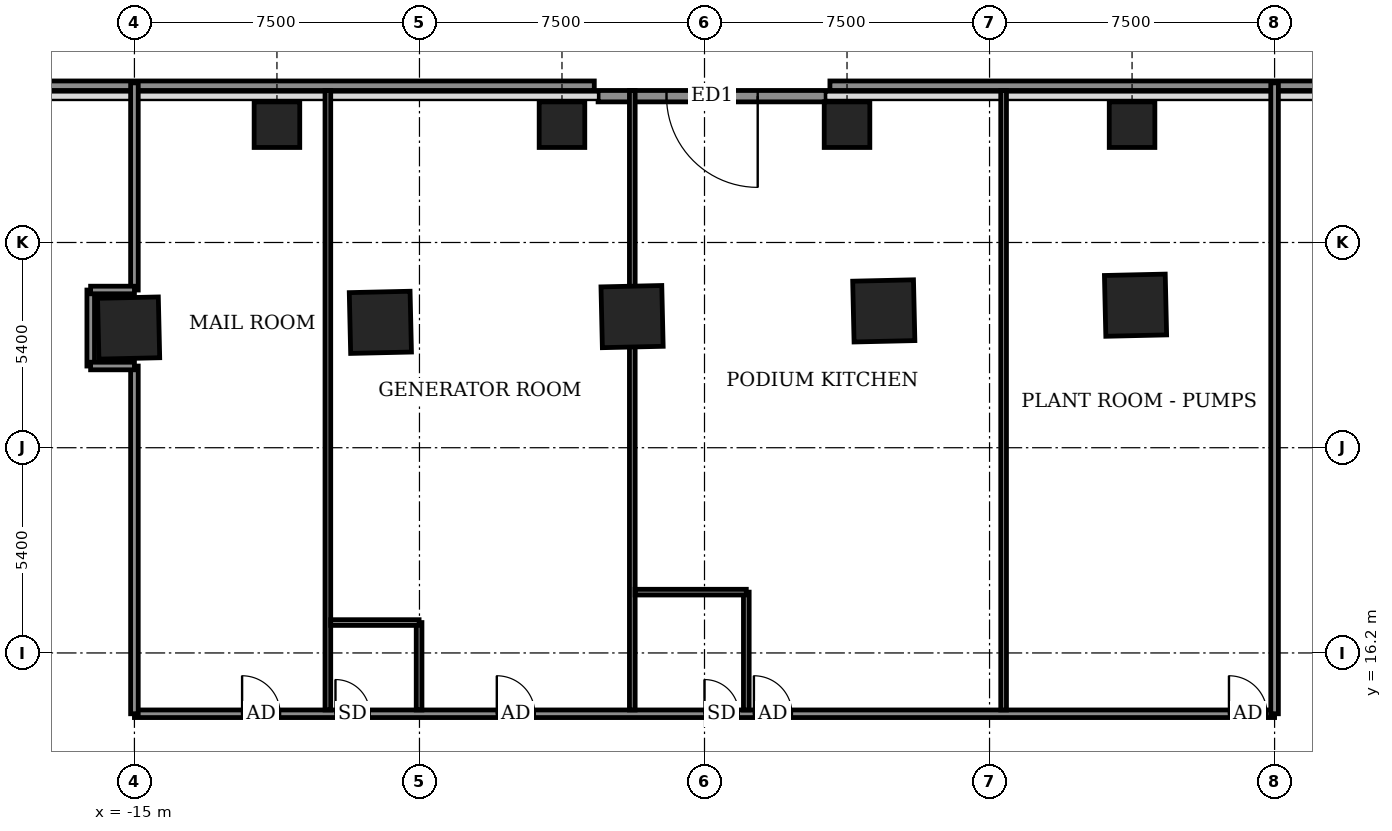
"""IFC4 building model, lengths in metres.
Left out: names, types, materials, properties, quantities, classifications, styles, units other than length and angle.
Written with IfcOpenShell. Run it as: python <this file> out.ifc"""

import sys

from ifc_helpers import new_model, si_unit, direction, frame, frame_2d, origin, origin_2d, place, context, subcontext, project, spatial, rectangle, extrude, element, fill, save


model = new_model("IFC4")
c1 = context("Model", 3, precision=1e-05, world=origin(), true_north=direction((0.0, 1.0)))
c2 = subcontext(c1, "Body", "Model", "MODEL_VIEW")
j1 = project(units=[si_unit("LENGTHUNIT", "METRE"), si_unit("PLANEANGLEUNIT", "RADIAN")], contexts=[c1])
p1 = place(None, origin())
s1 = spatial("IfcSite", under=j1, at=p1, CompositionType="ELEMENT")
p2 = place(p1, origin())
s2 = spatial("IfcBuilding", under=s1, at=p2, CompositionType="ELEMENT")
p3 = place(p2, origin())
s3 = spatial("IfcBuildingStorey", under=s2, at=p3, CompositionType="ELEMENT", Elevation=0.0)
for number, where, z_axis, x_axis in (
    (1, (11.341, 25.35, -0.3), (0.0, 0.0, 1.0), (-1.0, -0.023, 0.0)),
    (2, (4.717, 25.2, -0.3), (0.0, 0.0, 1.0), (-1.0, -0.023, 0.0)),
    (3, (-1.906, 25.05, -0.3), (0.0, 0.0, 1.0), (-1.0, -0.023, 0.0)),
    (4, (-8.529, 24.899, -0.3), (0.0, 0.0, 1.0), (-1.0, -0.023, 0.0)),
    (5, (-15.153, 24.749, -0.3), (0.0, 0.0, 1.0), (-1.0, -0.023, 0.0)),
):
    element("IfcColumn", number, at=place(p3, frame(where, z_axis=z_axis, x_axis=x_axis)), inside=s3, PredefinedType="COLUMN", context=c2, shape_type="SweptSolid", body=[
        extrude(rectangle(XDim=1.6, YDim=1.6, at=origin_2d()), origin(), (0.0, 0.0, 1.0), 5.75),
    ])
for number, where, z_axis, x_axis in (
    (6, (-11.25, 30.1, -0.3), (0.0, 0.0, 1.0), (1.0, 0.0, 0.0)),
    (7, (-3.75, 30.1, -0.3), (0.0, 0.0, 1.0), (1.0, 0.0, 0.0)),
    (8, (3.75, 30.1, -0.3), (0.0, 0.0, 1.0), (1.0, 0.0, 0.0)),
    (9, (11.25, 30.1, -0.3), (0.0, 0.0, 1.0), (1.0, 0.0, 0.0)),
):
    element("IfcColumn", number, at=place(p3, frame(where, z_axis=z_axis, x_axis=x_axis)), inside=s3, PredefinedType="COLUMN", context=c2, shape_type="SweptSolid", body=[
        extrude(rectangle(XDim=1.2, YDim=1.2, at=origin_2d()), origin(), (0.0, 0.0, 1.0), 5.75),
    ])
p4 = place(p3, frame((3.2, 30.85, 0.0), z_axis=(0.0, 0.0, 1.0), x_axis=(-1.0, 0.0, 0.0)))
e10 = element("IfcWall", 10, at=p4, inside=s3, PredefinedType="SOLIDWALL", context=c2, shape_type="SweptSolid", body=[
    extrude(rectangle(XDim=6.0, YDim=0.3, at=frame_2d((3.0, 0.0))), origin(), (0.0, 0.0, 1.0), 5.45),
])
p5 = place(p4, frame((1.8, 0.0, 0.0)))
e11 = element("IfcOpeningElement", 11, at=p5, cuts=e10, PredefinedType="OPENING", context=c2, shape_type="SweptSolid", body=[
    extrude(rectangle(XDim=2.4, YDim=2.7, at=frame_2d((1.2, 1.35))), frame((0.0, 0.16, 0.0), z_axis=(0.0, -1.0, 0.0), x_axis=(1.0, 0.0, 0.0)), (0.0, 0.0, 1.0), 0.32),
])
p6 = place(p3, frame((32.2, 31.125, 0.0), z_axis=(0.0, 0.0, 1.0), x_axis=(-1.0, 0.0, 0.0)))
e12 = element("IfcWall", 12, at=p6, inside=s3, PredefinedType="STANDARD", context=c2, shape_type="SweptSolid", body=[
    extrude(rectangle(XDim=28.9, YDim=0.25, at=frame_2d((14.45, 0.0))), origin(), (0.0, 0.0, 1.0), 0.9),
])
p7 = place(p3, frame((-2.9, 31.125, 0.0), z_axis=(0.0, 0.0, 1.0), x_axis=(-1.0, 0.0, 0.0)))
e13 = element("IfcWall", 13, at=p7, inside=s3, PredefinedType="STANDARD", context=c2, shape_type="SweptSolid", body=[
    extrude(rectangle(XDim=29.3, YDim=0.25, at=frame_2d((14.65, 0.0))), origin(), (0.0, 0.0, 1.0), 0.9),
])
p8 = place(p3, frame((-15.0, 14.6, 0.0), z_axis=(0.0, 0.0, 1.0), x_axis=(1.0, 0.0, 0.0)))
e14 = element("IfcWall", 14, at=p8, inside=s3, PredefinedType="PARTITIONING", context=c2, shape_type="SweptSolid", body=[
    extrude(rectangle(XDim=30.0, YDim=0.2, at=frame_2d((15.0, 0.0))), origin(), (0.0, 0.0, 1.0), 5.45),
])
p9 = place(p8, frame((2.833, 0.0, 0.0)))
e15 = element("IfcOpeningElement", 15, at=p9, cuts=e14, PredefinedType="OPENING", context=c2, shape_type="SweptSolid", body=[
    extrude(rectangle(XDim=1.0, YDim=2.1, at=frame_2d((0.5, 1.05))), frame((0.0, 0.11, 0.0), z_axis=(0.0, -1.0, 0.0), x_axis=(1.0, 0.0, 0.0)), (0.0, 0.0, 1.0), 0.22),
])
p10 = place(p8, frame((9.535, 0.0, 0.0)))
e16 = element("IfcOpeningElement", 16, at=p10, cuts=e14, PredefinedType="OPENING", context=c2, shape_type="SweptSolid", body=[
    extrude(rectangle(XDim=1.0, YDim=2.1, at=frame_2d((0.5, 1.05))), frame((0.0, 0.11, 0.0), z_axis=(0.0, -1.0, 0.0), x_axis=(1.0, 0.0, 0.0)), (0.0, 0.0, 1.0), 0.22),
])
p11 = place(p8, frame((5.29, 0.0, 0.0)))
e17 = element("IfcOpeningElement", 17, at=p11, cuts=e14, PredefinedType="OPENING", context=c2, shape_type="SweptSolid", body=[
    extrude(rectangle(XDim=0.9, YDim=2.1, at=frame_2d((0.45, 1.05))), frame((0.0, 0.11, 0.0), z_axis=(0.0, -1.0, 0.0), x_axis=(1.0, 0.0, 0.0)), (0.0, 0.0, 1.0), 0.22),
])
p12 = place(p8, frame((16.3, 0.0, 0.0)))
e18 = element("IfcOpeningElement", 18, at=p12, cuts=e14, PredefinedType="OPENING", context=c2, shape_type="SweptSolid", body=[
    extrude(rectangle(XDim=1.0, YDim=2.1, at=frame_2d((0.5, 1.05))), frame((0.0, 0.11, 0.0), z_axis=(0.0, -1.0, 0.0), x_axis=(1.0, 0.0, 0.0)), (0.0, 0.0, 1.0), 0.22),
])
p13 = place(p8, frame((15.0, 0.0, 0.0)))
e19 = element("IfcOpeningElement", 19, at=p13, cuts=e14, PredefinedType="OPENING", context=c2, shape_type="SweptSolid", body=[
    extrude(rectangle(XDim=0.9, YDim=2.1, at=frame_2d((0.45, 1.05))), frame((0.0, 0.11, 0.0), z_axis=(0.0, -1.0, 0.0), x_axis=(1.0, 0.0, 0.0)), (0.0, 0.0, 1.0), 0.22),
])
p14 = place(p8, frame((28.8, 0.0, 0.0)))
e20 = element("IfcOpeningElement", 20, at=p14, cuts=e14, PredefinedType="OPENING", context=c2, shape_type="SweptSolid", body=[
    extrude(rectangle(XDim=1.0, YDim=2.1, at=frame_2d((0.5, 1.05))), frame((0.0, 0.11, 0.0), z_axis=(0.0, -1.0, 0.0), x_axis=(1.0, 0.0, 0.0)), (0.0, 0.0, 1.0), 0.22),
])
p15 = place(p3, frame((-15.0, 14.6, 0.0), z_axis=(0.0, 0.0, 1.0), x_axis=(0.0, 1.0, 0.0)))
e21 = element("IfcWall", 21, at=p15, inside=s3, PredefinedType="PARTITIONING", context=c2, shape_type="SweptSolid", body=[
    extrude(rectangle(XDim=9.149, YDim=0.2, at=frame_2d((4.574, 0.0))), origin(), (0.0, 0.0, 1.0), 5.45),
])
p16 = place(p3, frame((-9.91, 14.7, 0.0), z_axis=(0.0, 0.0, 1.0), x_axis=(0.0, 1.0, 0.0)))
e22 = element("IfcWall", 22, at=p16, inside=s3, PredefinedType="PARTITIONING", context=c2, shape_type="SweptSolid", body=[
    extrude(rectangle(XDim=16.3, YDim=0.15, at=frame_2d((8.15, 0.0))), origin(), (0.0, 0.0, 1.0), 4.49),
])
p17 = place(p3, frame((-7.51, 14.7, 0.0), z_axis=(0.0, 0.0, 1.0), x_axis=(0.0, 1.0, 0.0)))
e23 = element("IfcWall", 23, at=p17, inside=s3, PredefinedType="PARTITIONING", context=c2, shape_type="SweptSolid", body=[
    extrude(rectangle(XDim=2.3, YDim=0.15, at=frame_2d((1.15, 0.0))), origin(), (0.0, 0.0, 1.0), 5.45),
])
p18 = place(p3, frame((-1.9, 14.7, 0.0), z_axis=(0.0, 0.0, 1.0), x_axis=(0.0, 1.0, 0.0)))
e24 = element("IfcWall", 24, at=p18, inside=s3, PredefinedType="PARTITIONING", context=c2, shape_type="SweptSolid", body=[
    extrude(rectangle(XDim=16.3, YDim=0.15, at=frame_2d((8.15, 0.0))), origin(), (0.0, 0.0, 1.0), 5.45),
])
p19 = place(p3, frame((1.1, 14.7, 0.0), z_axis=(0.0, 0.0, 1.0), x_axis=(0.0, 1.0, 0.0)))
e25 = element("IfcWall", 25, at=p19, inside=s3, PredefinedType="PARTITIONING", context=c2, shape_type="SweptSolid", body=[
    extrude(rectangle(XDim=3.1, YDim=0.15, at=frame_2d((1.55, 0.0))), origin(), (0.0, 0.0, 1.0), 5.45),
])
p20 = place(p3, frame((7.87, 14.7, 0.0), z_axis=(0.0, 0.0, 1.0), x_axis=(0.0, 1.0, 0.0)))
e26 = element("IfcWall", 26, at=p20, inside=s3, PredefinedType="PARTITIONING", context=c2, shape_type="SweptSolid", body=[
    extrude(rectangle(XDim=16.3, YDim=0.15, at=frame_2d((8.15, 0.0))), origin(), (0.0, 0.0, 1.0), 4.49),
])
p21 = place(p3, frame((15.0, 14.6, 0.0), z_axis=(0.0, 0.0, 1.0), x_axis=(0.0, 1.0, 0.0)))
e27 = element("IfcWall", 27, at=p21, inside=s3, PredefinedType="PARTITIONING", context=c2, shape_type="SweptSolid", body=[
    extrude(rectangle(XDim=16.6, YDim=0.2, at=frame_2d((8.3, 0.0))), origin(), (0.0, 0.0, 1.0), 4.49),
])
p22 = place(p3, frame((-9.835, 17.0, 0.0), z_axis=(0.0, 0.0, 1.0), x_axis=(1.0, 0.0, 0.0)))
e28 = element("IfcWall", 28, at=p22, inside=s3, PredefinedType="PARTITIONING", context=c2, shape_type="SweptSolid", body=[
    extrude(rectangle(XDim=2.325, YDim=0.15, at=frame_2d((1.163, 0.0))), origin(), (0.0, 0.0, 1.0), 5.45),
])
p23 = place(p3, frame((-1.825, 17.8, 0.0), z_axis=(0.0, 0.0, 1.0), x_axis=(1.0, 0.0, 0.0)))
e29 = element("IfcWall", 29, at=p23, inside=s3, PredefinedType="PARTITIONING", context=c2, shape_type="SweptSolid", body=[
    extrude(rectangle(XDim=2.925, YDim=0.15, at=frame_2d((1.462, 0.0))), origin(), (0.0, 0.0, 1.0), 5.45),
])
p24 = place(p3, frame((-16.15, 23.749, 0.0), z_axis=(0.0, 0.0, 1.0), x_axis=(0.0, 1.0, 0.0)))
e30 = element("IfcWall", 30, at=p24, inside=s3, PredefinedType="PARTITIONING", context=c2, shape_type="SweptSolid", body=[
    extrude(rectangle(XDim=2.0, YDim=0.2, at=frame_2d((1.0, 0.0))), origin(), (0.0, 0.0, 1.0), 5.45),
])
p25 = place(p3, frame((-16.153, 23.75, 0.0), z_axis=(0.0, 0.0, 1.0), x_axis=(1.0, 0.0, 0.0)))
e31 = element("IfcWall", 31, at=p25, inside=s3, PredefinedType="PARTITIONING", context=c2, shape_type="SweptSolid", body=[
    extrude(rectangle(XDim=1.153, YDim=0.2, at=frame_2d((0.577, 0.0))), origin(), (0.0, 0.0, 1.0), 5.45),
])
p26 = place(p3, frame((-15.0, 25.749, 0.0), z_axis=(0.0, 0.0, 1.0), x_axis=(0.0, 1.0, 0.0)))
e32 = element("IfcWall", 32, at=p26, inside=s3, PredefinedType="PARTITIONING", context=c2, shape_type="SweptSolid", body=[
    extrude(rectangle(XDim=5.451, YDim=0.2, at=frame_2d((2.726, 0.0))), origin(), (0.0, 0.0, 1.0), 4.49),
])
p27 = place(p3, frame((-16.153, 25.75, 0.0), z_axis=(0.0, 0.0, 1.0), x_axis=(1.0, 0.0, 0.0)))
e33 = element("IfcWall", 33, at=p27, inside=s3, PredefinedType="PARTITIONING", context=c2, shape_type="SweptSolid", body=[
    extrude(rectangle(XDim=1.153, YDim=0.2, at=frame_2d((0.577, 0.0))), origin(), (0.0, 0.0, 1.0), 5.45),
])
p28 = place(p5, origin())
e34 = element("IfcDoor", 34, at=p28, inside=s3, OperationType="DOUBLE_DOOR_DOUBLE_SWING", PredefinedType="DOOR", context=c2, shape_type="SweptSolid", body=[
    extrude(rectangle(XDim=2.4, YDim=2.7, at=frame_2d((1.2, 1.35))), frame((0.0, 0.025, 0.0), z_axis=(0.0, -1.0, 0.0), x_axis=(1.0, 0.0, 0.0)), (0.0, 0.0, 1.0), 0.05),
])
fill(e11, e34)
p29 = place(p9, origin())
e35 = element("IfcDoor", 35, at=p29, inside=s3, OperationType="SINGLE_SWING_RIGHT", PredefinedType="DOOR", context=c2, shape_type="SweptSolid", body=[
    extrude(rectangle(XDim=1.0, YDim=2.1, at=frame_2d((0.5, 1.05))), frame((0.0, 0.025, 0.0), z_axis=(0.0, -1.0, 0.0), x_axis=(1.0, 0.0, 0.0)), (0.0, 0.0, 1.0), 0.05),
])
fill(e15, e35)
p30 = place(p10, origin())
e36 = element("IfcDoor", 36, at=p30, inside=s3, OperationType="SINGLE_SWING_LEFT", PredefinedType="DOOR", context=c2, shape_type="SweptSolid", body=[
    extrude(rectangle(XDim=1.0, YDim=2.1, at=frame_2d((0.5, 1.05))), frame((0.0, 0.025, 0.0), z_axis=(0.0, -1.0, 0.0), x_axis=(1.0, 0.0, 0.0)), (0.0, 0.0, 1.0), 0.05),
])
fill(e16, e36)
p31 = place(p11, origin())
e37 = element("IfcDoor", 37, at=p31, inside=s3, OperationType="SINGLE_SWING_RIGHT", PredefinedType="DOOR", context=c2, shape_type="SweptSolid", body=[
    extrude(rectangle(XDim=0.9, YDim=2.1, at=frame_2d((0.45, 1.05))), frame((0.0, 0.025, 0.0), z_axis=(0.0, -1.0, 0.0), x_axis=(1.0, 0.0, 0.0)), (0.0, 0.0, 1.0), 0.05),
])
fill(e17, e37)
p32 = place(p12, origin())
e38 = element("IfcDoor", 38, at=p32, inside=s3, OperationType="SINGLE_SWING_RIGHT", PredefinedType="DOOR", context=c2, shape_type="SweptSolid", body=[
    extrude(rectangle(XDim=1.0, YDim=2.1, at=frame_2d((0.5, 1.05))), frame((0.0, 0.025, 0.0), z_axis=(0.0, -1.0, 0.0), x_axis=(1.0, 0.0, 0.0)), (0.0, 0.0, 1.0), 0.05),
])
fill(e18, e38)
p33 = place(p13, origin())
e39 = element("IfcDoor", 39, at=p33, inside=s3, OperationType="SINGLE_SWING_LEFT", PredefinedType="DOOR", context=c2, shape_type="SweptSolid", body=[
    extrude(rectangle(XDim=0.9, YDim=2.1, at=frame_2d((0.45, 1.05))), frame((0.0, 0.025, 0.0), z_axis=(0.0, -1.0, 0.0), x_axis=(1.0, 0.0, 0.0)), (0.0, 0.0, 1.0), 0.05),
])
fill(e19, e39)
p34 = place(p14, origin())
e40 = element("IfcDoor", 40, at=p34, inside=s3, OperationType="SINGLE_SWING_LEFT", PredefinedType="DOOR", context=c2, shape_type="SweptSolid", body=[
    extrude(rectangle(XDim=1.0, YDim=2.1, at=frame_2d((0.5, 1.05))), frame((0.0, 0.025, 0.0), z_axis=(0.0, -1.0, 0.0), x_axis=(1.0, 0.0, 0.0)), (0.0, 0.0, 1.0), 0.05),
])
fill(e20, e40)
save(model, sys.argv[1])
